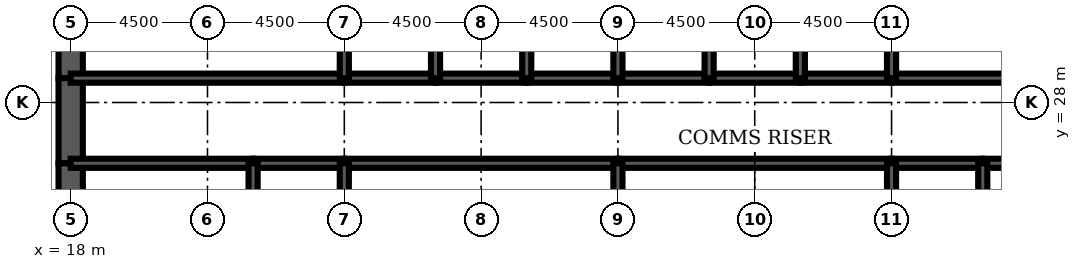
"""IFC4 building model, lengths in metres.
Left out: names, types, materials, properties, quantities, classifications, styles, units other than length and angle.
Written with IfcOpenShell. Run it as: python <this file> out.ifc"""

import sys

from ifc_helpers import new_model, si_unit, direction, frame, frame_2d, origin, place, context, subcontext, project, spatial, rectangle, extrude, element, fill, save


model = new_model("IFC4")
c1 = context("Model", 3, precision=1e-05, world=origin(), true_north=direction((0.0, 1.0)))
c2 = subcontext(c1, "Body", "Model", "MODEL_VIEW")
j1 = project(units=[si_unit("LENGTHUNIT", "METRE"), si_unit("PLANEANGLEUNIT", "RADIAN")], contexts=[c1])
p1 = place(None, origin())
s1 = spatial("IfcSite", under=j1, at=p1, CompositionType="ELEMENT")
p2 = place(p1, origin())
s2 = spatial("IfcBuilding", under=s1, at=p2, CompositionType="ELEMENT")
p3 = place(p2, frame((0.0, 0.0, 236.2)))
s3 = spatial("IfcBuildingStorey", under=s2, at=p3, CompositionType="ELEMENT", Elevation=236.2)
p4 = place(p3, frame((18.0, 32.0, 0.0), z_axis=(0.0, 0.0, 1.0), x_axis=(0.0, -1.0, 0.0)))
e1 = element("IfcWall", 1, at=p4, inside=s3, PredefinedType="SHEAR", context=c2, shape_type="SweptSolid", body=[
    extrude(rectangle(XDim=3.2, YDim=0.8, at=frame_2d((1.6, 0.0))), origin(), (0.0, 0.0, 1.0), 4.2),
])
p5 = place(p3, frame((18.0, 28.8, 0.0), z_axis=(0.0, 0.0, 1.0), x_axis=(0.0, -1.0, 0.0)))
e2 = element("IfcWall", 2, at=p5, inside=s3, PredefinedType="SHEAR", context=c2, shape_type="SweptSolid", body=[
    extrude(rectangle(XDim=2.8, YDim=0.8, at=frame_2d((1.4, 0.0))), origin(), (0.0, 0.0, 1.0), 4.2),
])
p6 = place(p5, frame((0.4, 0.0, 0.0)))
e3 = element("IfcOpeningElement", 3, at=p6, cuts=e2, PredefinedType="OPENING", context=c2, shape_type="SweptSolid", body=[
    extrude(rectangle(XDim=1.8, YDim=2.1, at=frame_2d((0.9, 1.05))), frame((0.0, 0.41, 0.0), z_axis=(0.0, -1.0, 0.0), x_axis=(1.0, 0.0, 0.0)), (0.0, 0.0, 1.0), 0.82),
])
p7 = place(p3, frame((18.0, 26.0, 0.0), z_axis=(0.0, 0.0, 1.0), x_axis=(0.0, -1.0, 0.0)))
e4 = element("IfcWall", 4, at=p7, inside=s3, PredefinedType="SHEAR", context=c2, shape_type="SweptSolid", body=[
    extrude(rectangle(XDim=4.0, YDim=0.8, at=frame_2d((2.0, 0.0))), origin(), (0.0, 0.0, 1.0), 4.2),
])
p8 = place(p3, frame((18.0, 28.8, 0.0), z_axis=(0.0, 0.0, 1.0), x_axis=(1.0, 0.0, 0.0)))
e5 = element("IfcWall", 5, at=p8, inside=s3, PredefinedType="SOLIDWALL", context=c2, shape_type="SweptSolid", body=[
    extrude(rectangle(XDim=9.0, YDim=0.3, at=frame_2d((4.5, 0.0))), origin(), (0.0, 0.0, 1.0), 4.2),
])
p9 = place(p8, frame((0.65, 0.0, 0.0)))
e6 = element("IfcOpeningElement", 6, at=p9, cuts=e5, PredefinedType="OPENING", context=c2, shape_type="SweptSolid", body=[
    extrude(rectangle(XDim=1.0, YDim=2.1, at=frame_2d((0.5, 1.05))), frame((0.0, 0.16, 0.0), z_axis=(0.0, -1.0, 0.0), x_axis=(1.0, 0.0, 0.0)), (0.0, 0.0, 1.0), 0.32),
])
p10 = place(p3, frame((27.0, 28.8, 0.0), z_axis=(0.0, 0.0, 1.0), x_axis=(1.0, 0.0, 0.0)))
e7 = element("IfcWall", 7, at=p10, inside=s3, PredefinedType="SOLIDWALL", context=c2, shape_type="SweptSolid", body=[
    extrude(rectangle(XDim=3.0, YDim=0.3, at=frame_2d((1.5, 0.0))), origin(), (0.0, 0.0, 1.0), 4.2),
])
p11 = place(p10, frame((0.95, 0.0, 0.0)))
e8 = element("IfcOpeningElement", 8, at=p11, cuts=e7, PredefinedType="OPENING", context=c2, shape_type="SweptSolid", body=[
    extrude(rectangle(XDim=1.1, YDim=2.2, at=frame_2d((0.55, 1.1))), frame((0.0, 0.16, 0.0), z_axis=(0.0, -1.0, 0.0), x_axis=(1.0, 0.0, 0.0)), (0.0, 0.0, 1.0), 0.32),
])
p12 = place(p3, frame((30.0, 28.8, 0.0), z_axis=(0.0, 0.0, 1.0), x_axis=(1.0, 0.0, 0.0)))
e9 = element("IfcWall", 9, at=p12, inside=s3, PredefinedType="SOLIDWALL", context=c2, shape_type="SweptSolid", body=[
    extrude(rectangle(XDim=3.0, YDim=0.3, at=frame_2d((1.5, 0.0))), origin(), (0.0, 0.0, 1.0), 4.2),
])
p13 = place(p12, frame((0.95, 0.0, 0.0)))
e10 = element("IfcOpeningElement", 10, at=p13, cuts=e9, PredefinedType="OPENING", context=c2, shape_type="SweptSolid", body=[
    extrude(rectangle(XDim=1.1, YDim=2.2, at=frame_2d((0.55, 1.1))), frame((0.0, 0.16, 0.0), z_axis=(0.0, -1.0, 0.0), x_axis=(1.0, 0.0, 0.0)), (0.0, 0.0, 1.0), 0.32),
])
p14 = place(p3, frame((33.0, 28.8, 0.0), z_axis=(0.0, 0.0, 1.0), x_axis=(1.0, 0.0, 0.0)))
e11 = element("IfcWall", 11, at=p14, inside=s3, PredefinedType="SOLIDWALL", context=c2, shape_type="SweptSolid", body=[
    extrude(rectangle(XDim=3.0, YDim=0.3, at=frame_2d((1.5, 0.0))), origin(), (0.0, 0.0, 1.0), 4.2),
])
p15 = place(p14, frame((0.95, 0.0, 0.0)))
e12 = element("IfcOpeningElement", 12, at=p15, cuts=e11, PredefinedType="OPENING", context=c2, shape_type="SweptSolid", body=[
    extrude(rectangle(XDim=1.1, YDim=2.2, at=frame_2d((0.55, 1.1))), frame((0.0, 0.16, 0.0), z_axis=(0.0, -1.0, 0.0), x_axis=(1.0, 0.0, 0.0)), (0.0, 0.0, 1.0), 0.32),
])
for number, where, z_axis, x_axis in (
    (13, (36.0, 28.8, 0.0), (0.0, 0.0, 1.0), (1.0, 0.0, 0.0)),
    (14, (39.0, 28.8, 0.0), (0.0, 0.0, 1.0), (1.0, 0.0, 0.0)),
):
    element("IfcWall", number, at=place(p3, frame(where, z_axis=z_axis, x_axis=x_axis)), inside=s3, PredefinedType="SOLIDWALL", context=c2, shape_type="SweptSolid", body=[
        extrude(rectangle(XDim=3.0, YDim=0.3, at=frame_2d((1.5, 0.0))), origin(), (0.0, 0.0, 1.0), 4.2),
    ])
p16 = place(p3, frame((42.0, 28.8, 0.0), z_axis=(0.0, 0.0, 1.0), x_axis=(1.0, 0.0, 0.0)))
e15 = element("IfcWall", 15, at=p16, inside=s3, PredefinedType="SOLIDWALL", context=c2, shape_type="SweptSolid", body=[
    extrude(rectangle(XDim=3.0, YDim=0.3, at=frame_2d((1.5, 0.0))), origin(), (0.0, 0.0, 1.0), 4.2),
])
p17 = place(p16, frame((0.95, 0.0, 0.0)))
e16 = element("IfcOpeningElement", 16, at=p17, cuts=e15, PredefinedType="OPENING", context=c2, shape_type="SweptSolid", body=[
    extrude(rectangle(XDim=1.1, YDim=2.2, at=frame_2d((0.55, 1.1))), frame((0.0, 0.16, 0.0), z_axis=(0.0, -1.0, 0.0), x_axis=(1.0, 0.0, 0.0)), (0.0, 0.0, 1.0), 0.32),
])
p18 = place(p3, frame((45.0, 28.8, 0.0), z_axis=(0.0, 0.0, 1.0), x_axis=(1.0, 0.0, 0.0)))
e17 = element("IfcWall", 17, at=p18, inside=s3, PredefinedType="SOLIDWALL", context=c2, shape_type="SweptSolid", body=[
    extrude(rectangle(XDim=9.0, YDim=0.3, at=frame_2d((4.5, 0.0))), origin(), (0.0, 0.0, 1.0), 4.2),
])
p19 = place(p18, frame((7.35, 0.0, 0.0)))
e18 = element("IfcOpeningElement", 18, at=p19, cuts=e17, PredefinedType="OPENING", context=c2, shape_type="SweptSolid", body=[
    extrude(rectangle(XDim=1.0, YDim=2.1, at=frame_2d((0.5, 1.05))), frame((0.0, 0.16, 0.0), z_axis=(0.0, -1.0, 0.0), x_axis=(1.0, 0.0, 0.0)), (0.0, 0.0, 1.0), 0.32),
])
p20 = place(p3, frame((18.0, 26.0, 0.0), z_axis=(0.0, 0.0, 1.0), x_axis=(1.0, 0.0, 0.0)))
e19 = element("IfcWall", 19, at=p20, inside=s3, PredefinedType="SOLIDWALL", context=c2, shape_type="SweptSolid", body=[
    extrude(rectangle(XDim=6.0, YDim=0.3, at=frame_2d((3.0, 0.0))), origin(), (0.0, 0.0, 1.0), 4.2),
])
p21 = place(p3, frame((24.0, 26.0, 0.0), z_axis=(0.0, 0.0, 1.0), x_axis=(1.0, 0.0, 0.0)))
e20 = element("IfcWall", 20, at=p21, inside=s3, PredefinedType="SOLIDWALL", context=c2, shape_type="SweptSolid", body=[
    extrude(rectangle(XDim=3.0, YDim=0.3, at=frame_2d((1.5, 0.0))), origin(), (0.0, 0.0, 1.0), 4.2),
])
for number, where, z_axis, x_axis in (
    (21, (27.0, 26.0, 0.0), (0.0, 0.0, 1.0), (1.0, 0.0, 0.0)),
    (22, (36.0, 26.0, 0.0), (0.0, 0.0, 1.0), (1.0, 0.0, 0.0)),
):
    element("IfcWall", number, at=place(p3, frame(where, z_axis=z_axis, x_axis=x_axis)), inside=s3, PredefinedType="SOLIDWALL", context=c2, shape_type="SweptSolid", body=[
        extrude(rectangle(XDim=9.0, YDim=0.3, at=frame_2d((4.5, 0.0))), origin(), (0.0, 0.0, 1.0), 4.2),
    ])
p22 = place(p3, frame((45.0, 26.0, 0.0), z_axis=(0.0, 0.0, 1.0), x_axis=(1.0, 0.0, 0.0)))
e23 = element("IfcWall", 23, at=p22, inside=s3, PredefinedType="SOLIDWALL", context=c2, shape_type="SweptSolid", body=[
    extrude(rectangle(XDim=3.0, YDim=0.3, at=frame_2d((1.5, 0.0))), origin(), (0.0, 0.0, 1.0), 4.2),
])
p23 = place(p3, frame((48.0, 26.0, 0.0), z_axis=(0.0, 0.0, 1.0), x_axis=(1.0, 0.0, 0.0)))
e24 = element("IfcWall", 24, at=p23, inside=s3, PredefinedType="SOLIDWALL", context=c2, shape_type="SweptSolid", body=[
    extrude(rectangle(XDim=6.0, YDim=0.3, at=frame_2d((3.0, 0.0))), origin(), (0.0, 0.0, 1.0), 4.2),
])
for number, where, z_axis, x_axis in (
    (25, (27.0, 28.8, 0.0), (0.0, 0.0, 1.0), (0.0, 1.0, 0.0)),
    (26, (30.0, 28.8, 0.0), (0.0, 0.0, 1.0), (0.0, 1.0, 0.0)),
    (27, (33.0, 28.8, 0.0), (0.0, 0.0, 1.0), (0.0, 1.0, 0.0)),
    (28, (36.0, 28.8, 0.0), (0.0, 0.0, 1.0), (0.0, 1.0, 0.0)),
    (29, (39.0, 28.8, 0.0), (0.0, 0.0, 1.0), (0.0, 1.0, 0.0)),
    (30, (42.0, 28.8, 0.0), (0.0, 0.0, 1.0), (0.0, 1.0, 0.0)),
    (31, (45.0, 28.8, 0.0), (0.0, 0.0, 1.0), (0.0, 1.0, 0.0)),
):
    element("IfcWall", number, at=place(p3, frame(where, z_axis=z_axis, x_axis=x_axis)), inside=s3, PredefinedType="SOLIDWALL", context=c2, shape_type="SweptSolid", body=[
        extrude(rectangle(XDim=3.2, YDim=0.3, at=frame_2d((1.6, 0.0))), origin(), (0.0, 0.0, 1.0), 4.2),
    ])
for number, where, z_axis, x_axis in (
    (32, (24.0, 22.0, 0.0), (0.0, 0.0, 1.0), (0.0, 1.0, 0.0)),
    (33, (27.0, 22.0, 0.0), (0.0, 0.0, 1.0), (0.0, 1.0, 0.0)),
    (34, (36.0, 22.0, 0.0), (0.0, 0.0, 1.0), (0.0, 1.0, 0.0)),
    (35, (45.0, 22.0, 0.0), (0.0, 0.0, 1.0), (0.0, 1.0, 0.0)),
    (36, (48.0, 22.0, 0.0), (0.0, 0.0, 1.0), (0.0, 1.0, 0.0)),
):
    element("IfcWall", number, at=place(p3, frame(where, z_axis=z_axis, x_axis=x_axis)), inside=s3, PredefinedType="SOLIDWALL", context=c2, shape_type="SweptSolid", body=[
        extrude(rectangle(XDim=4.0, YDim=0.3, at=frame_2d((2.0, 0.0))), origin(), (0.0, 0.0, 1.0), 4.2),
    ])
p24 = place(p3, frame((20.575, 22.15, 0.0), z_axis=(0.0, 0.0, 1.0), x_axis=(0.0, 1.0, 0.0)))
e37 = element("IfcWall", 37, at=p24, inside=s3, PredefinedType="PARTITIONING", context=c2, shape_type="SweptSolid", body=[
    extrude(rectangle(XDim=3.7, YDim=0.15, at=frame_2d((1.85, 0.0))), origin(), (0.0, 0.0, 1.0), 3.0),
])
p25 = place(p3, frame((47.7, 26.15, 0.0), z_axis=(0.0, 0.0, 1.0), x_axis=(0.0, 1.0, 0.0)))
e38 = element("IfcWall", 38, at=p25, inside=s3, PredefinedType="PARTITIONING", context=c2, shape_type="SweptSolid", body=[
    extrude(rectangle(XDim=2.5, YDim=0.15, at=frame_2d((1.25, 0.0))), origin(), (0.0, 0.0, 1.0), 3.0),
])
p26 = place(p25, frame((1.15, 0.0, 0.0)))
e39 = element("IfcOpeningElement", 39, at=p26, cuts=e38, PredefinedType="OPENING", context=c2, shape_type="SweptSolid", body=[
    extrude(rectangle(XDim=1.0, YDim=2.1, at=frame_2d((0.5, 1.05))), frame((0.0, 0.085, 0.0), z_axis=(0.0, -1.0, 0.0), x_axis=(1.0, 0.0, 0.0)), (0.0, 0.0, 1.0), 0.17),
])
p27 = place(p26, origin())
e40 = element("IfcDoor", 40, at=p27, inside=s3, OperationType="SINGLE_SWING_RIGHT", PredefinedType="DOOR", context=c2, shape_type="SweptSolid", body=[
    extrude(rectangle(XDim=1.0, YDim=2.1, at=frame_2d((0.5, 1.05))), frame((0.0, 0.025, 0.0), z_axis=(0.0, -1.0, 0.0), x_axis=(1.0, 0.0, 0.0)), (0.0, 0.0, 1.0), 0.05),
])
fill(e39, e40)
p28 = place(p17, origin())
e41 = element("IfcDoor", 41, at=p28, inside=s3, OperationType="DOUBLE_DOOR_SLIDING", PredefinedType="USERDEFINED", context=c2, shape_type="SweptSolid", body=[
    extrude(rectangle(XDim=1.1, YDim=2.2, at=frame_2d((0.55, 1.1))), frame((0.0, 0.025, 0.0), z_axis=(0.0, -1.0, 0.0), x_axis=(1.0, 0.0, 0.0)), (0.0, 0.0, 1.0), 0.05),
])
fill(e16, e41)
p29 = place(p11, origin())
e42 = element("IfcDoor", 42, at=p29, inside=s3, OperationType="DOUBLE_DOOR_SLIDING", PredefinedType="USERDEFINED", context=c2, shape_type="SweptSolid", body=[
    extrude(rectangle(XDim=1.1, YDim=2.2, at=frame_2d((0.55, 1.1))), frame((0.0, 0.025, 0.0), z_axis=(0.0, -1.0, 0.0), x_axis=(1.0, 0.0, 0.0)), (0.0, 0.0, 1.0), 0.05),
])
fill(e8, e42)
p30 = place(p13, origin())
e43 = element("IfcDoor", 43, at=p30, inside=s3, OperationType="DOUBLE_DOOR_SLIDING", PredefinedType="USERDEFINED", context=c2, shape_type="SweptSolid", body=[
    extrude(rectangle(XDim=1.1, YDim=2.2, at=frame_2d((0.55, 1.1))), frame((0.0, 0.025, 0.0), z_axis=(0.0, -1.0, 0.0), x_axis=(1.0, 0.0, 0.0)), (0.0, 0.0, 1.0), 0.05),
])
fill(e10, e43)
p31 = place(p15, origin())
e44 = element("IfcDoor", 44, at=p31, inside=s3, OperationType="DOUBLE_DOOR_SLIDING", PredefinedType="USERDEFINED", context=c2, shape_type="SweptSolid", body=[
    extrude(rectangle(XDim=1.1, YDim=2.2, at=frame_2d((0.55, 1.1))), frame((0.0, 0.025, 0.0), z_axis=(0.0, -1.0, 0.0), x_axis=(1.0, 0.0, 0.0)), (0.0, 0.0, 1.0), 0.05),
])
fill(e12, e44)
p32 = place(p9, origin())
e45 = element("IfcDoor", 45, at=p32, inside=s3, OperationType="SINGLE_SWING_LEFT", PredefinedType="DOOR", context=c2, shape_type="SweptSolid", body=[
    extrude(rectangle(XDim=1.0, YDim=2.1, at=frame_2d((0.5, 1.05))), frame((0.0, 0.025, 0.0), z_axis=(0.0, -1.0, 0.0), x_axis=(1.0, 0.0, 0.0)), (0.0, 0.0, 1.0), 0.05),
])
fill(e6, e45)
p33 = place(p6, origin())
e46 = element("IfcDoor", 46, at=p33, inside=s3, OperationType="SINGLE_SWING_LEFT", PredefinedType="DOOR", context=c2, shape_type="SweptSolid", body=[
    extrude(rectangle(XDim=1.8, YDim=2.1, at=frame_2d((0.9, 1.05))), frame((0.0, 0.4, 0.0), z_axis=(0.0, -1.0, 0.0), x_axis=(1.0, 0.0, 0.0)), (0.0, 0.0, 1.0), 0.8),
])
fill(e3, e46)
save(model, sys.argv[1])
